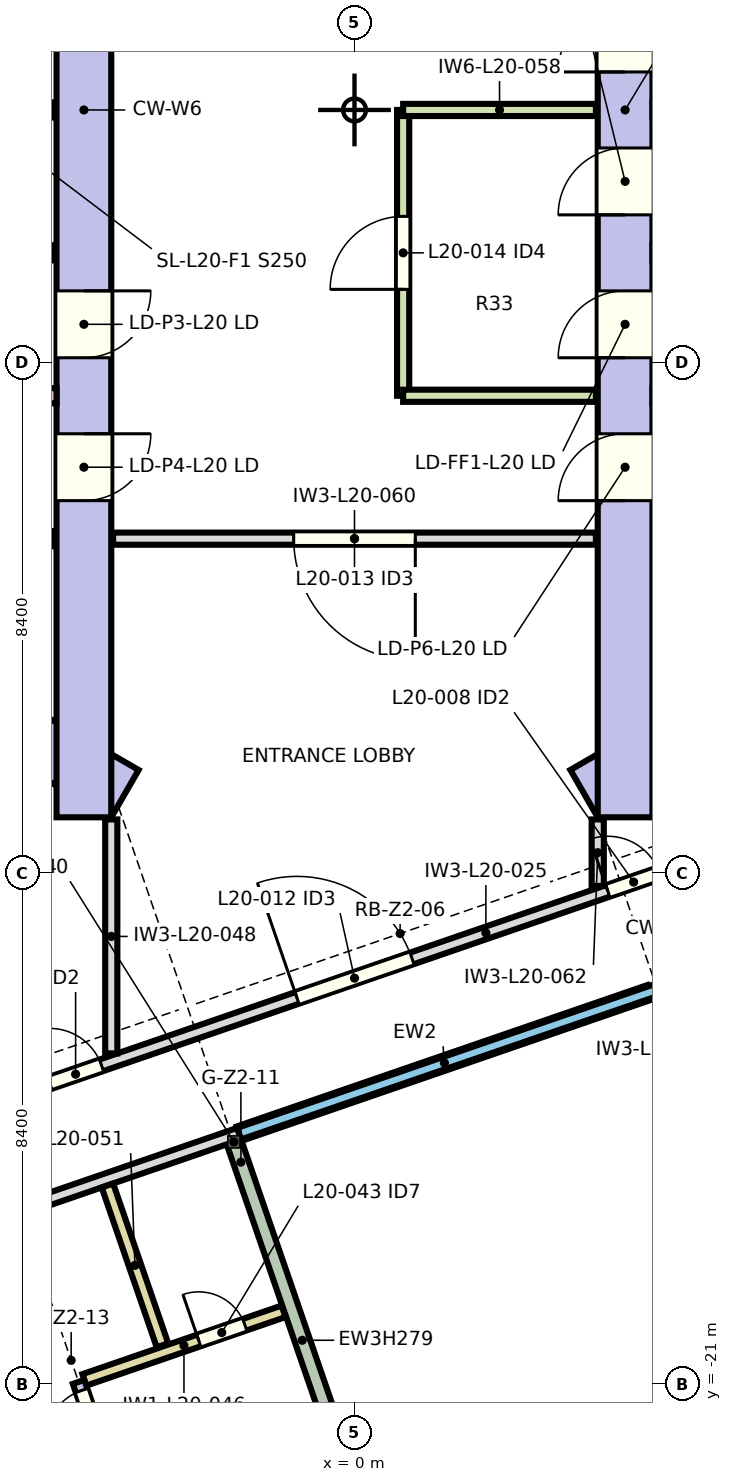
"""IFC4 building model, lengths in metres.
Left out: names, types, materials, properties, quantities, classifications, styles, units other than length and angle.
Written with IfcOpenShell. Run it as: python <this file> out.ifc"""

import sys

from ifc_helpers import new_model, si_unit, direction, frame, frame_2d, origin, place, context, subcontext, project, spatial, rectangle, extrude, element, fill, save


model = new_model("IFC4")
c1 = context("Model", 3, precision=1e-05, world=origin(), true_north=direction((0.0, 1.0)))
c2 = subcontext(c1, "Body", "Model", "MODEL_VIEW")
j1 = project(units=[si_unit("LENGTHUNIT", "METRE"), si_unit("PLANEANGLEUNIT", "RADIAN")], contexts=[c1])
p1 = place(None, origin())
s1 = spatial("IfcSite", under=j1, at=p1, CompositionType="ELEMENT")
p2 = place(p1, origin())
s2 = spatial("IfcBuilding", under=s1, at=p2, CompositionType="ELEMENT")
p3 = place(p2, frame((0.0, 0.0, 104.1)))
s3 = spatial("IfcBuildingStorey", under=s2, at=p3, CompositionType="ELEMENT", Elevation=104.1)
p4 = place(p3, frame((-3.775, -11.243, 0.0), z_axis=(0.0, 0.0, 1.0), x_axis=(-0.866026961591, 0.49999730179, 0.0)))
e1 = element("IfcWall", 1, at=p4, inside=s3, PredefinedType="SHEAR", context=c2, shape_type="SweptSolid", body=[
    extrude(rectangle(XDim=5.587, YDim=0.9, at=frame_2d((2.794, 0.0))), origin(), (0.0, 0.0, 1.0), 3.8),
])
p5 = place(p3, frame((-4.45, 11.633, 0.0), z_axis=(0.0, 0.0, 1.0), x_axis=(0.0, -1.0, 0.0)))
e2 = element("IfcWall", 2, at=p5, inside=s3, PredefinedType="SHEAR", context=c2, shape_type="SweptSolid", body=[
    extrude(rectangle(XDim=23.265, YDim=0.9, at=frame_2d((11.633, 0.0))), origin(), (0.0, 0.0, 1.0), 3.8),
])
p6 = place(p5, frame((14.607, 0.0, 0.0)))
e3 = element("IfcOpeningElement", 3, at=p6, cuts=e2, PredefinedType="OPENING", context=c2, shape_type="SweptSolid", body=[
    extrude(rectangle(XDim=1.1, YDim=2.1, at=frame_2d((0.55, 1.05))), frame((0.0, 0.46, 0.0), z_axis=(0.0, -1.0, 0.0), x_axis=(1.0, 0.0, 0.0)), (0.0, 0.0, 1.0), 0.92),
])
p7 = place(p5, frame((16.958, 0.0, 0.0)))
e4 = element("IfcOpeningElement", 4, at=p7, cuts=e2, PredefinedType="OPENING", context=c2, shape_type="SweptSolid", body=[
    extrude(rectangle(XDim=1.1, YDim=2.1, at=frame_2d((0.55, 1.05))), frame((0.0, 0.46, 0.0), z_axis=(0.0, -1.0, 0.0), x_axis=(1.0, 0.0, 0.0)), (0.0, 0.0, 1.0), 0.92),
])
p8 = place(p5, frame((5.208, 0.0, 0.0)))
e5 = element("IfcOpeningElement", 5, at=p8, cuts=e2, PredefinedType="OPENING", context=c2, shape_type="SweptSolid", body=[
    extrude(rectangle(XDim=1.1, YDim=2.1, at=frame_2d((0.55, 1.05))), frame((0.0, 0.46, 0.0), z_axis=(0.0, -1.0, 0.0), x_axis=(1.0, 0.0, 0.0)), (0.0, 0.0, 1.0), 0.92),
])
p9 = place(p3, frame((8.614, -8.449, 0.0), z_axis=(0.0, 0.0, 1.0), x_axis=(-0.866026961591, -0.49999730179, 0.0)))
e6 = element("IfcWall", 6, at=p9, inside=s3, PredefinedType="SHEAR", context=c2, shape_type="SweptSolid", body=[
    extrude(rectangle(XDim=5.587, YDim=0.9, at=frame_2d((2.794, 0.0))), origin(), (0.0, 0.0, 1.0), 3.8),
])
p10 = place(p3, frame((4.45, -11.633, 0.0), z_axis=(0.0, 0.0, 1.0), x_axis=(0.0, 1.0, 0.0)))
e7 = element("IfcWall", 7, at=p10, inside=s3, PredefinedType="SHEAR", context=c2, shape_type="SweptSolid", body=[
    extrude(rectangle(XDim=23.265, YDim=0.9, at=frame_2d((11.633, 0.0))), origin(), (0.0, 0.0, 1.0), 3.8),
])
p11 = place(p10, frame((7.558, 0.0, 0.0)))
e8 = element("IfcOpeningElement", 8, at=p11, cuts=e7, PredefinedType="OPENING", context=c2, shape_type="SweptSolid", body=[
    extrude(rectangle(XDim=1.1, YDim=2.1, at=frame_2d((0.55, 1.05))), frame((0.0, 0.46, 0.0), z_axis=(0.0, -1.0, 0.0), x_axis=(1.0, 0.0, 0.0)), (0.0, 0.0, 1.0), 0.92),
])
p12 = place(p10, frame((9.907, 0.0, 0.0)))
e9 = element("IfcOpeningElement", 9, at=p12, cuts=e7, PredefinedType="OPENING", context=c2, shape_type="SweptSolid", body=[
    extrude(rectangle(XDim=1.1, YDim=2.1, at=frame_2d((0.55, 1.05))), frame((0.0, 0.46, 0.0), z_axis=(0.0, -1.0, 0.0), x_axis=(1.0, 0.0, 0.0)), (0.0, 0.0, 1.0), 0.92),
])
p13 = place(p10, frame((12.258, 0.0, 0.0)))
e10 = element("IfcOpeningElement", 10, at=p13, cuts=e7, PredefinedType="OPENING", context=c2, shape_type="SweptSolid", body=[
    extrude(rectangle(XDim=1.1, YDim=2.1, at=frame_2d((0.55, 1.05))), frame((0.0, 0.46, 0.0), z_axis=(0.0, -1.0, 0.0), x_axis=(1.0, 0.0, 0.0)), (0.0, 0.0, 1.0), 0.92),
])
p14 = place(p10, frame((14.607, 0.0, 0.0)))
e11 = element("IfcOpeningElement", 11, at=p14, cuts=e7, PredefinedType="OPENING", context=c2, shape_type="SweptSolid", body=[
    extrude(rectangle(XDim=1.1, YDim=2.1, at=frame_2d((0.55, 1.05))), frame((0.0, 0.46, 0.0), z_axis=(0.0, -1.0, 0.0), x_axis=(1.0, 0.0, 0.0)), (0.0, 0.0, 1.0), 0.92),
])
p15 = place(p10, frame((5.208, 0.0, 0.0)))
e12 = element("IfcOpeningElement", 12, at=p15, cuts=e7, PredefinedType="OPENING", context=c2, shape_type="SweptSolid", body=[
    extrude(rectangle(XDim=1.1, YDim=2.1, at=frame_2d((0.55, 1.05))), frame((0.0, 0.46, 0.0), z_axis=(0.0, -1.0, 0.0), x_axis=(1.0, 0.0, 0.0)), (0.0, 0.0, 1.0), 0.92),
])
p16 = place(p10, frame((17.008, 0.0, 0.0)))
e13 = element("IfcOpeningElement", 13, at=p16, cuts=e7, PredefinedType="OPENING", context=c2, shape_type="SweptSolid", body=[
    extrude(rectangle(XDim=1.0, YDim=2.1, at=frame_2d((0.5, 1.05))), frame((0.0, 0.46, 0.0), z_axis=(0.0, -1.0, 0.0), x_axis=(1.0, 0.0, 0.0)), (0.0, 0.0, 1.0), 0.92),
])
p17 = place(p3, frame((0.263, -23.494, 0.0), z_axis=(0.0, 0.0, 1.0), x_axis=(-0.325585020105, 0.945512768123, 0.0)))
e14 = element("IfcWall", 14, at=p17, inside=s3, PredefinedType="SOLIDWALL", context=c2, shape_type="SweptSolid", body=[
    extrude(rectangle(XDim=6.9, YDim=0.25, at=frame_2d((3.45, 0.0))), origin(), (0.0, 0.0, 1.0), 2.795),
])
p18 = place(p3, frame((-1.897, -16.835, 2.868), z_axis=(0.0, 0.0, 1.0), x_axis=(0.945515675847, 0.325576575828, 0.0)))
e15 = element("IfcWall", 15, at=p18, inside=s3, PredefinedType="SOLIDWALL", context=c2, shape_type="SweptSolid", body=[
    extrude(rectangle(XDim=7.141, YDim=0.25, at=frame_2d((3.571, 0.0))), origin(), (0.0, 0.0, 1.0), 0.632),
])
p19 = place(p3, frame((-12.605, -20.522, 0.0), z_axis=(0.0, 0.0, 1.0), x_axis=(0.945519963328, 0.325564124172, 0.0)))
e16 = element("IfcWall", 16, at=p19, inside=s3, PredefinedType="PARTITIONING", context=c2, shape_type="SweptSolid", body=[
    extrude(rectangle(XDim=11.325, YDim=0.2, at=frame_2d((5.663, 0.0))), origin(), (0.0, 0.0, 1.0), 3.55),
])
p20 = place(p19, frame((5.9, 0.0, 0.0)))
e17 = element("IfcOpeningElement", 17, at=p20, cuts=e16, PredefinedType="OPENING", context=c2, shape_type="SweptSolid", body=[
    extrude(rectangle(XDim=1.0, YDim=2.1, at=frame_2d((0.5, 1.05))), frame((0.0, 0.11, 0.0), z_axis=(0.0, -1.0, 0.0), x_axis=(1.0, 0.0, 0.0)), (0.0, 0.0, 1.0), 0.22),
])
p21 = place(p19, frame((0.25, 0.0, 0.0)))
e18 = element("IfcOpeningElement", 18, at=p21, cuts=e16, PredefinedType="OPENING", context=c2, shape_type="SweptSolid", body=[
    extrude(rectangle(XDim=1.0, YDim=2.1, at=frame_2d((0.5, 1.05))), frame((0.0, 0.11, 0.0), z_axis=(0.0, -1.0, 0.0), x_axis=(1.0, 0.0, 0.0)), (0.0, 0.0, 1.0), 0.22),
])
p22 = place(p3, frame((4.854, -14.51, 0.0), z_axis=(0.0, 0.0, 1.0), x_axis=(0.945634074283, 0.325232528438, 0.0)))
e19 = element("IfcWall", 19, at=p22, inside=s3, PredefinedType="PARTITIONING", context=c2, shape_type="SweptSolid", body=[
    extrude(rectangle(XDim=0.268, YDim=0.2, at=frame_2d((0.134, 0.0))), origin(), (0.0, 0.0, 1.0), 3.55),
])
p23 = place(p3, frame((-11.49, -18.234, 0.0), z_axis=(0.0, 0.0, 1.0), x_axis=(0.945519622926, 0.325565112782, 0.0)))
e20 = element("IfcWall", 20, at=p23, inside=s3, PredefinedType="PARTITIONING", context=c2, shape_type="SweptSolid", body=[
    extrude(rectangle(XDim=28.873, YDim=0.2, at=frame_2d((14.437, 0.0))), origin(), (0.0, 0.0, 1.0), 3.55),
])
p24 = place(p23, frame((6.851, 0.0, 0.0)))
e21 = element("IfcOpeningElement", 21, at=p24, cuts=e20, PredefinedType="OPENING", context=c2, shape_type="SweptSolid", body=[
    extrude(rectangle(XDim=0.9, YDim=2.1, at=frame_2d((0.45, 1.05))), frame((0.0, 0.11, 0.0), z_axis=(0.0, -1.0, 0.0), x_axis=(1.0, 0.0, 0.0)), (0.0, 0.0, 1.0), 0.22),
])
p25 = place(p23, frame((16.557, 0.0, 0.0)))
e22 = element("IfcOpeningElement", 22, at=p25, cuts=e20, PredefinedType="OPENING", context=c2, shape_type="SweptSolid", body=[
    extrude(rectangle(XDim=0.9, YDim=2.1, at=frame_2d((0.45, 1.05))), frame((0.0, 0.11, 0.0), z_axis=(0.0, -1.0, 0.0), x_axis=(1.0, 0.0, 0.0)), (0.0, 0.0, 1.0), 0.22),
])
p26 = place(p23, frame((11.152, 0.0, 0.0)))
e23 = element("IfcOpeningElement", 23, at=p26, cuts=e20, PredefinedType="OPENING", context=c2, shape_type="SweptSolid", body=[
    extrude(rectangle(XDim=2.0, YDim=2.1, at=frame_2d((1.0, 1.05))), frame((0.0, 0.11, 0.0), z_axis=(0.0, -1.0, 0.0), x_axis=(1.0, 0.0, 0.0)), (0.0, 0.0, 1.0), 0.22),
])
p27 = place(p3, frame((-7.7, -7.05, 0.0), z_axis=(0.0, 0.0, 1.0), x_axis=(1.0, 0.0, 0.0)))
e24 = element("IfcWall", 24, at=p27, inside=s3, PredefinedType="SOLIDWALL", context=c2, shape_type="SweptSolid", body=[
    extrude(rectangle(XDim=2.77, YDim=0.25, at=frame_2d((1.385, 0.0))), origin(), (0.0, 0.0, 1.0), 3.55),
])
p28 = place(p3, frame((-7.575, -4.7, 0.0), z_axis=(0.0, 0.0, 1.0), x_axis=(1.0, 0.0, 0.0)))
e25 = element("IfcWall", 25, at=p28, inside=s3, PredefinedType="SOLIDWALL", context=c2, shape_type="SweptSolid", body=[
    extrude(rectangle(XDim=2.675, YDim=0.25, at=frame_2d((1.337, 0.0))), origin(), (0.0, 0.0, 1.0), 3.55),
])
for number, where, z_axis, x_axis in (
    (26, (-7.575, -2.35, 0.0), (0.0, 0.0, 1.0), (1.0, 0.0, 0.0)),
    (27, (-7.575, 0.0, 0.0), (0.0, 0.0, 1.0), (1.0, 0.0, 0.0)),
):
    element("IfcWall", number, at=place(p3, frame(where, z_axis=z_axis, x_axis=x_axis)), inside=s3, PredefinedType="SOLIDWALL", context=c2, shape_type="SweptSolid", body=[
        extrude(rectangle(XDim=2.645, YDim=0.25, at=frame_2d((1.323, 0.0))), origin(), (0.0, 0.0, 1.0), 3.55),
    ])
p29 = place(p3, frame((-4.443, -20.884, 0.0), z_axis=(0.0, 0.0, 1.0), x_axis=(0.945515898571, 0.325575929009, 0.0)))
e28 = element("IfcWall", 28, at=p29, inside=s3, PredefinedType="PARTITIONING", context=c2, shape_type="SweptSolid", body=[
    extrude(rectangle(XDim=3.465, YDim=0.2, at=frame_2d((1.732, 0.0))), origin(), (0.0, 0.0, 1.0), 3.55),
])
p30 = place(p29, frame((1.99, 0.0, 0.0)))
e29 = element("IfcOpeningElement", 29, at=p30, cuts=e28, PredefinedType="OPENING", context=c2, shape_type="SweptSolid", body=[
    extrude(rectangle(XDim=0.8, YDim=2.1, at=frame_2d((0.4, 1.05))), frame((0.0, 0.11, 0.0), z_axis=(0.0, -1.0, 0.0), x_axis=(1.0, 0.0, 0.0)), (0.0, 0.0, 1.0), 0.22),
])
p31 = place(p3, frame((-4.0, -11.667, 0.0), z_axis=(0.0, 0.0, 1.0), x_axis=(0.0, -1.0, 0.0)))
e30 = element("IfcWall", 30, at=p31, inside=s3, PredefinedType="PARTITIONING", context=c2, shape_type="SweptSolid", body=[
    extrude(rectangle(XDim=3.848, YDim=0.2, at=frame_2d((1.924, 0.0))), origin(), (0.0, 0.0, 1.0), 3.55),
])
p32 = place(p3, frame((-3.158, -20.315, 0.0), z_axis=(0.0, 0.0, 1.0), x_axis=(-0.325538681008, 0.945528723608, 0.0)))
e31 = element("IfcWall", 31, at=p32, inside=s3, PredefinedType="PARTITIONING", context=c2, shape_type="SweptSolid", body=[
    extrude(rectangle(XDim=2.78, YDim=0.2, at=frame_2d((1.39, 0.0))), origin(), (0.0, 0.0, 1.0), 3.55),
])
p33 = place(p3, frame((-3.082, -25.143, 0.0), z_axis=(0.0, 0.0, 1.0), x_axis=(-0.325568171973, 0.945518569568, 0.0)))
e32 = element("IfcWall", 32, at=p33, inside=s3, PredefinedType="PARTITIONING", context=c2, shape_type="SweptSolid", body=[
    extrude(rectangle(XDim=4.47, YDim=0.2, at=frame_2d((2.235, 0.0))), origin(), (0.0, 0.0, 1.0), 3.05),
])
p34 = place(p33, frame((3.42, 0.0, 0.0)))
e33 = element("IfcOpeningElement", 33, at=p34, cuts=e32, PredefinedType="OPENING", context=c2, shape_type="SweptSolid", body=[
    extrude(rectangle(XDim=0.9, YDim=2.1, at=frame_2d((0.45, 1.05))), frame((0.0, 0.11, 0.0), z_axis=(0.0, -1.0, 0.0), x_axis=(1.0, 0.0, 0.0)), (0.0, 0.0, 1.0), 0.22),
])
p35 = place(p3, frame((0.8, -4.7, 0.0), z_axis=(0.0, 0.0, 1.0), x_axis=(0.0, 1.0, 0.0)))
e34 = element("IfcWall", 34, at=p35, inside=s3, PredefinedType="SOLIDWALL", context=c2, shape_type="SweptSolid", body=[
    extrude(rectangle(XDim=4.7, YDim=0.2, at=frame_2d((2.35, 0.0))), origin(), (0.0, 0.0, 1.0), 3.55),
])
p36 = place(p35, frame((1.75, 0.0, 0.0)))
e35 = element("IfcOpeningElement", 35, at=p36, cuts=e34, PredefinedType="OPENING", context=c2, shape_type="SweptSolid", body=[
    extrude(rectangle(XDim=1.2, YDim=2.1, at=frame_2d((0.6, 1.05))), frame((0.0, 0.11, 0.0), z_axis=(0.0, -1.0, 0.0), x_axis=(1.0, 0.0, 0.0)), (0.0, 0.0, 1.0), 0.22),
])
p37 = place(p3, frame((0.8, 0.0, 0.0), z_axis=(0.0, 0.0, 1.0), x_axis=(1.0, 0.0, 0.0)))
e36 = element("IfcWall", 36, at=p37, inside=s3, PredefinedType="SOLIDWALL", context=c2, shape_type="SweptSolid", body=[
    extrude(rectangle(XDim=3.17, YDim=0.2, at=frame_2d((1.585, 0.0))), origin(), (0.0, 0.0, 1.0), 3.55),
])
p38 = place(p3, frame((3.97, -7.05, 0.0), z_axis=(0.0, 0.0, 1.0), x_axis=(-1.0, 0.0, 0.0)))
e37 = element("IfcWall", 37, at=p38, inside=s3, PredefinedType="PARTITIONING", context=c2, shape_type="SweptSolid", body=[
    extrude(rectangle(XDim=7.94, YDim=0.2, at=frame_2d((3.97, 0.0))), origin(), (0.0, 0.0, 1.0), 3.55),
])
p39 = place(p38, frame((2.97, 0.0, 0.0)))
e38 = element("IfcOpeningElement", 38, at=p39, cuts=e37, PredefinedType="OPENING", context=c2, shape_type="SweptSolid", body=[
    extrude(rectangle(XDim=2.0, YDim=2.1, at=frame_2d((1.0, 1.05))), frame((0.0, 0.11, 0.0), z_axis=(0.0, -1.0, 0.0), x_axis=(1.0, 0.0, 0.0)), (0.0, 0.0, 1.0), 0.22),
])
p40 = place(p3, frame((3.97, -4.7, 0.0), z_axis=(0.0, 0.0, 1.0), x_axis=(-1.0, 0.0, 0.0)))
e39 = element("IfcWall", 39, at=p40, inside=s3, PredefinedType="SOLIDWALL", context=c2, shape_type="SweptSolid", body=[
    extrude(rectangle(XDim=3.17, YDim=0.2, at=frame_2d((1.585, 0.0))), origin(), (0.0, 0.0, 1.0), 3.55),
])
p41 = place(p3, frame((4.0, -12.76, 0.0), z_axis=(0.0, 0.0, 1.0), x_axis=(0.0, 1.0, 0.0)))
e40 = element("IfcWall", 40, at=p41, inside=s3, PredefinedType="PARTITIONING", context=c2, shape_type="SweptSolid", body=[
    extrude(rectangle(XDim=1.093, YDim=0.2, at=frame_2d((0.547, 0.0))), origin(), (0.0, 0.0, 1.0), 3.55),
])
for number, where, z_axis, x_axis in (
    (41, (4.9, -4.7, 0.0), (0.0, 0.0, 1.0), (1.0, 0.0, 0.0)),
    (42, (4.9, 0.0, 0.0), (0.0, 0.0, 1.0), (1.0, 0.0, 0.0)),
):
    element("IfcWall", number, at=place(p3, frame(where, z_axis=z_axis, x_axis=x_axis)), inside=s3, PredefinedType="SOLIDWALL", context=c2, shape_type="SweptSolid", body=[
        extrude(rectangle(XDim=2.675, YDim=0.25, at=frame_2d((1.337, 0.0))), origin(), (0.0, 0.0, 1.0), 3.55),
    ])
p42 = place(p24, origin())
e43 = element("IfcDoor", 43, at=p42, inside=s3, OperationType="NOTDEFINED", PredefinedType="DOOR", context=c2, shape_type="SweptSolid", body=[
    extrude(rectangle(XDim=0.9, YDim=2.1, at=frame_2d((0.45, 1.05))), frame((0.0, 0.025, 0.0), z_axis=(0.0, -1.0, 0.0), x_axis=(1.0, 0.0, 0.0)), (0.0, 0.0, 1.0), 0.05),
])
fill(e21, e43)
p43 = place(p25, origin())
e44 = element("IfcDoor", 44, at=p43, inside=s3, OperationType="NOTDEFINED", PredefinedType="DOOR", context=c2, shape_type="SweptSolid", body=[
    extrude(rectangle(XDim=0.9, YDim=2.1, at=frame_2d((0.45, 1.05))), frame((0.0, 0.025, 0.0), z_axis=(0.0, -1.0, 0.0), x_axis=(1.0, 0.0, 0.0)), (0.0, 0.0, 1.0), 0.05),
])
fill(e22, e44)
p44 = place(p26, origin())
e45 = element("IfcDoor", 45, at=p44, inside=s3, OperationType="NOTDEFINED", PredefinedType="DOOR", context=c2, shape_type="SweptSolid", body=[
    extrude(rectangle(XDim=2.0, YDim=2.1, at=frame_2d((1.0, 1.05))), frame((0.0, 0.025, 0.0), z_axis=(0.0, -1.0, 0.0), x_axis=(1.0, 0.0, 0.0)), (0.0, 0.0, 1.0), 0.05),
])
fill(e23, e45)
p45 = place(p39, origin())
e46 = element("IfcDoor", 46, at=p45, inside=s3, OperationType="NOTDEFINED", PredefinedType="DOOR", context=c2, shape_type="SweptSolid", body=[
    extrude(rectangle(XDim=2.0, YDim=2.1, at=frame_2d((1.0, 1.05))), frame((0.0, 0.025, 0.0), z_axis=(0.0, -1.0, 0.0), x_axis=(1.0, 0.0, 0.0)), (0.0, 0.0, 1.0), 0.05),
])
fill(e38, e46)
p46 = place(p36, origin())
e47 = element("IfcDoor", 47, at=p46, inside=s3, OperationType="NOTDEFINED", PredefinedType="DOOR", context=c2, shape_type="SweptSolid", body=[
    extrude(rectangle(XDim=1.2, YDim=2.1, at=frame_2d((0.6, 1.05))), frame((0.0, 0.025, 0.0), z_axis=(0.0, -1.0, 0.0), x_axis=(1.0, 0.0, 0.0)), (0.0, 0.0, 1.0), 0.05),
])
fill(e35, e47)
p47 = place(p34, origin())
e48 = element("IfcDoor", 48, at=p47, inside=s3, OperationType="NOTDEFINED", PredefinedType="DOOR", context=c2, shape_type="SweptSolid", body=[
    extrude(rectangle(XDim=0.9, YDim=2.1, at=frame_2d((0.45, 1.05))), frame((0.0, 0.025, 0.0), z_axis=(0.0, -1.0, 0.0), x_axis=(1.0, 0.0, 0.0)), (0.0, 0.0, 1.0), 0.05),
])
fill(e33, e48)
p48 = place(p30, origin())
e49 = element("IfcDoor", 49, at=p48, inside=s3, OperationType="NOTDEFINED", PredefinedType="DOOR", context=c2, shape_type="SweptSolid", body=[
    extrude(rectangle(XDim=0.8, YDim=2.1, at=frame_2d((0.4, 1.05))), frame((0.0, 0.025, 0.0), z_axis=(0.0, -1.0, 0.0), x_axis=(1.0, 0.0, 0.0)), (0.0, 0.0, 1.0), 0.05),
])
fill(e29, e49)
p49 = place(p11, origin())
e50 = element("IfcDoor", 50, at=p49, inside=s3, OperationType="SLIDING_TO_LEFT", PredefinedType="DOOR", context=c2, shape_type="SweptSolid", body=[
    extrude(rectangle(XDim=1.1, YDim=2.1, at=frame_2d((0.55, 1.05))), frame((0.0, 0.025, 0.0), z_axis=(0.0, -1.0, 0.0), x_axis=(1.0, 0.0, 0.0)), (0.0, 0.0, 1.0), 0.05),
])
fill(e8, e50)
p50 = place(p12, origin())
e51 = element("IfcDoor", 51, at=p50, inside=s3, OperationType="SLIDING_TO_LEFT", PredefinedType="DOOR", context=c2, shape_type="SweptSolid", body=[
    extrude(rectangle(XDim=1.1, YDim=2.1, at=frame_2d((0.55, 1.05))), frame((0.0, 0.025, 0.0), z_axis=(0.0, -1.0, 0.0), x_axis=(1.0, 0.0, 0.0)), (0.0, 0.0, 1.0), 0.05),
])
fill(e9, e51)
p51 = place(p13, origin())
e52 = element("IfcDoor", 52, at=p51, inside=s3, OperationType="SLIDING_TO_LEFT", PredefinedType="DOOR", context=c2, shape_type="SweptSolid", body=[
    extrude(rectangle(XDim=1.1, YDim=2.1, at=frame_2d((0.55, 1.05))), frame((0.0, 0.025, 0.0), z_axis=(0.0, -1.0, 0.0), x_axis=(1.0, 0.0, 0.0)), (0.0, 0.0, 1.0), 0.05),
])
fill(e10, e52)
p52 = place(p6, origin())
e53 = element("IfcDoor", 53, at=p52, inside=s3, OperationType="SLIDING_TO_LEFT", PredefinedType="DOOR", context=c2, shape_type="SweptSolid", body=[
    extrude(rectangle(XDim=1.1, YDim=2.1, at=frame_2d((0.55, 1.05))), frame((0.0, 0.025, 0.0), z_axis=(0.0, -1.0, 0.0), x_axis=(1.0, 0.0, 0.0)), (0.0, 0.0, 1.0), 0.05),
])
fill(e3, e53)
p53 = place(p7, origin())
e54 = element("IfcDoor", 54, at=p53, inside=s3, OperationType="SLIDING_TO_LEFT", PredefinedType="DOOR", context=c2, shape_type="SweptSolid", body=[
    extrude(rectangle(XDim=1.1, YDim=2.1, at=frame_2d((0.55, 1.05))), frame((0.0, 0.025, 0.0), z_axis=(0.0, -1.0, 0.0), x_axis=(1.0, 0.0, 0.0)), (0.0, 0.0, 1.0), 0.05),
])
fill(e4, e54)
p54 = place(p15, origin())
e55 = element("IfcDoor", 55, at=p54, inside=s3, OperationType="SLIDING_TO_LEFT", PredefinedType="DOOR", context=c2, shape_type="SweptSolid", body=[
    extrude(rectangle(XDim=1.1, YDim=2.1, at=frame_2d((0.55, 1.05))), frame((0.0, 0.025, 0.0), z_axis=(0.0, -1.0, 0.0), x_axis=(1.0, 0.0, 0.0)), (0.0, 0.0, 1.0), 0.05),
])
fill(e12, e55)
save(model, sys.argv[1])
